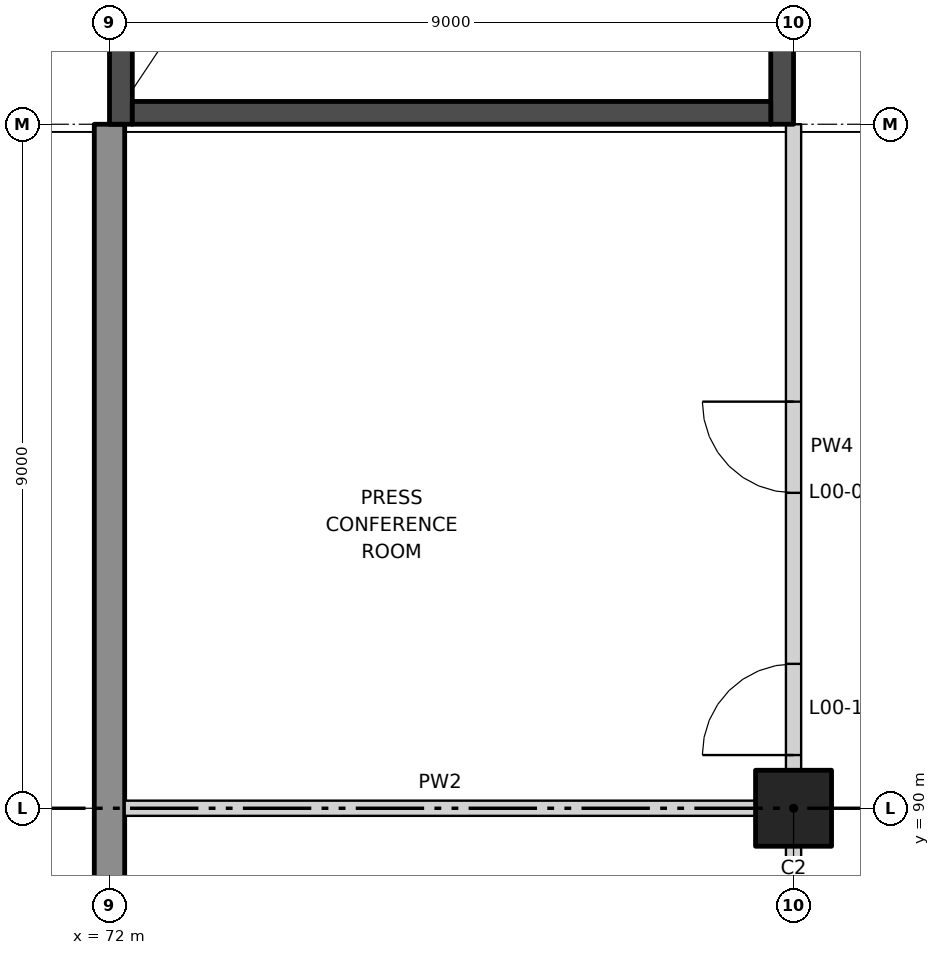
"""IFC4 building model, lengths in metres.
Left out: names, types, materials, properties, quantities, classifications, styles, units other than length and angle.
Written with IfcOpenShell. Run it as: python <this file> out.ifc"""

import sys

from ifc_helpers import new_model, si_unit, direction, frame, frame_2d, origin, origin_2d, place, context, subcontext, project, spatial, rectangle, extrude, element, fill, save


model = new_model("IFC4")
c1 = context("Model", 3, precision=1e-05, world=origin(), true_north=direction((0.0, 1.0)))
c2 = subcontext(c1, "Body", "Model", "MODEL_VIEW")
j1 = project(units=[si_unit("LENGTHUNIT", "METRE"), si_unit("PLANEANGLEUNIT", "RADIAN")], contexts=[c1])
p1 = place(None, origin())
s1 = spatial("IfcSite", under=j1, at=p1, CompositionType="ELEMENT")
p2 = place(p1, origin())
s2 = spatial("IfcBuilding", under=s1, at=p2, CompositionType="ELEMENT")
p3 = place(p2, origin())
s3 = spatial("IfcBuildingStorey", under=s2, at=p3, CompositionType="ELEMENT", Elevation=0.0)
p4 = place(p3, frame((81.0, 90.0, 0.0), z_axis=(0.0, 0.0, 1.0), x_axis=(1.0, 0.0, 0.0)))
e1 = element("IfcColumn", 1, at=p4, inside=s3, PredefinedType="COLUMN", context=c2, shape_type="SweptSolid", body=[
    extrude(rectangle(XDim=1.0, YDim=1.0, at=origin_2d()), origin(), (0.0, 0.0, 1.0), 7.0),
])
p5 = place(p3, frame((72.0, 99.0, 0.0), z_axis=(0.0, 0.0, 1.0), x_axis=(0.0, -1.0, 0.0)))
e2 = element("IfcWall", 2, at=p5, inside=s3, PredefinedType="SOLIDWALL", context=c2, shape_type="SweptSolid", body=[
    extrude(rectangle(XDim=27.3, YDim=0.4, at=frame_2d((13.65, 0.0))), origin(), (0.0, 0.0, 1.0), 7.0),
])
p6 = place(p3, frame((72.2, 90.0, 0.0), z_axis=(0.0, 0.0, 1.0), x_axis=(1.0, 0.0, 0.0)))
e3 = element("IfcWall", 3, at=p6, inside=s3, PredefinedType="PARTITIONING", context=c2, shape_type="SweptSolid", body=[
    extrude(rectangle(XDim=8.3, YDim=0.2, at=frame_2d((4.15, 0.0))), origin(), (0.0, 0.0, 1.0), 5.75),
])
p7 = place(p3, frame((81.0, 81.5, 0.0), z_axis=(0.0, 0.0, 1.0), x_axis=(0.0, 1.0, 0.0)))
e4 = element("IfcWall", 4, at=p7, inside=s3, PredefinedType="PARTITIONING", context=c2, shape_type="SweptSolid", body=[
    extrude(rectangle(XDim=8.0, YDim=0.2, at=frame_2d((4.0, 0.0))), origin(), (0.0, 0.0, 1.0), 5.75),
])
p8 = place(p7, frame((3.5, 0.0, 0.0)))
e5 = element("IfcOpeningElement", 5, at=p8, cuts=e4, PredefinedType="OPENING", context=c2, shape_type="SweptSolid", body=[
    extrude(rectangle(XDim=1.0, YDim=2.1, at=frame_2d((0.5, 1.05))), frame((0.0, 0.11, 0.0), z_axis=(0.0, -1.0, 0.0), x_axis=(1.0, 0.0, 0.0)), (0.0, 0.0, 1.0), 0.22),
])
p9 = place(p7, frame((0.2, 0.0, 0.0)))
e6 = element("IfcOpeningElement", 6, at=p9, cuts=e4, PredefinedType="OPENING", context=c2, shape_type="SweptSolid", body=[
    extrude(rectangle(XDim=1.0, YDim=2.1, at=frame_2d((0.5, 1.05))), frame((0.0, 0.11, 0.0), z_axis=(0.0, -1.0, 0.0), x_axis=(1.0, 0.0, 0.0)), (0.0, 0.0, 1.0), 0.22),
])
p10 = place(p3, frame((81.0, 90.5, 0.0), z_axis=(0.0, 0.0, 1.0), x_axis=(0.0, 1.0, 0.0)))
e7 = element("IfcWall", 7, at=p10, inside=s3, PredefinedType="PARTITIONING", context=c2, shape_type="SweptSolid", body=[
    extrude(rectangle(XDim=8.5, YDim=0.2, at=frame_2d((4.25, 0.0))), origin(), (0.0, 0.0, 1.0), 5.65),
])
p11 = place(p10, frame((3.65, 0.0, 0.0)))
e8 = element("IfcOpeningElement", 8, at=p11, cuts=e7, PredefinedType="OPENING", context=c2, shape_type="SweptSolid", body=[
    extrude(rectangle(XDim=1.2, YDim=2.1, at=frame_2d((0.6, 1.05))), frame((0.0, 0.11, 0.0), z_axis=(0.0, -1.0, 0.0), x_axis=(1.0, 0.0, 0.0)), (0.0, 0.0, 1.0), 0.22),
])
p12 = place(p10, frame((0.2, 0.0, 0.0)))
e9 = element("IfcOpeningElement", 9, at=p12, cuts=e7, PredefinedType="OPENING", context=c2, shape_type="SweptSolid", body=[
    extrude(rectangle(XDim=1.2, YDim=2.1, at=frame_2d((0.6, 1.05))), frame((0.0, 0.11, 0.0), z_axis=(0.0, -1.0, 0.0), x_axis=(1.0, 0.0, 0.0)), (0.0, 0.0, 1.0), 0.22),
])
p13 = place(p3, frame((80.85, 99.0, 0.0), z_axis=(0.0, 0.0, 1.0), x_axis=(0.0, 1.0, 0.0)))
e10 = element("IfcWall", 10, at=p13, inside=s3, PredefinedType="SHEAR", context=c2, shape_type="SweptSolid", body=[
    extrude(rectangle(XDim=18.0, YDim=0.3, at=frame_2d((9.0, 0.0))), origin(), (0.0, 0.0, 1.0), 7.0),
])
p14 = place(p13, frame((8.6, 0.0, 0.0)))
e11 = element("IfcOpeningElement", 11, at=p14, cuts=e10, PredefinedType="OPENING", context=c2, shape_type="SweptSolid", body=[
    extrude(rectangle(XDim=1.2, YDim=2.1, at=frame_2d((0.6, 1.05))), frame((0.0, 0.16, 0.0), z_axis=(0.0, -1.0, 0.0), x_axis=(1.0, 0.0, 0.0)), (0.0, 0.0, 1.0), 0.32),
])
p15 = place(p3, frame((72.15, 99.0, 0.0), z_axis=(0.0, 0.0, 1.0), x_axis=(0.0, 1.0, 0.0)))
e12 = element("IfcWall", 12, at=p15, inside=s3, PredefinedType="SHEAR", context=c2, shape_type="SweptSolid", body=[
    extrude(rectangle(XDim=18.0, YDim=0.3, at=frame_2d((9.0, 0.0))), origin(), (0.0, 0.0, 1.0), 7.0),
])
p16 = place(p3, frame((80.7, 99.15, 0.0), z_axis=(0.0, 0.0, 1.0), x_axis=(-1.0, 0.0, 0.0)))
e13 = element("IfcWall", 13, at=p16, inside=s3, PredefinedType="SHEAR", context=c2, shape_type="SweptSolid", body=[
    extrude(rectangle(XDim=8.4, YDim=0.3, at=frame_2d((4.2, 0.0))), origin(), (0.0, 0.0, 1.0), 7.0),
])
p17 = place(p11, origin())
e14 = element("IfcDoor", 14, at=p17, inside=s3, OperationType="SINGLE_SWING_RIGHT", PredefinedType="DOOR", context=c2, shape_type="SweptSolid", body=[
    extrude(rectangle(XDim=1.2, YDim=2.1, at=frame_2d((0.6, 1.05))), frame((0.0, 0.025, 0.0), z_axis=(0.0, -1.0, 0.0), x_axis=(1.0, 0.0, 0.0)), (0.0, 0.0, 1.0), 0.05),
])
fill(e8, e14)
p18 = place(p12, origin())
e15 = element("IfcDoor", 15, at=p18, inside=s3, OperationType="SINGLE_SWING_LEFT", PredefinedType="DOOR", context=c2, shape_type="SweptSolid", body=[
    extrude(rectangle(XDim=1.2, YDim=2.1, at=frame_2d((0.6, 1.05))), frame((0.0, 0.025, 0.0), z_axis=(0.0, -1.0, 0.0), x_axis=(1.0, 0.0, 0.0)), (0.0, 0.0, 1.0), 0.05),
])
fill(e9, e15)
save(model, sys.argv[1])
